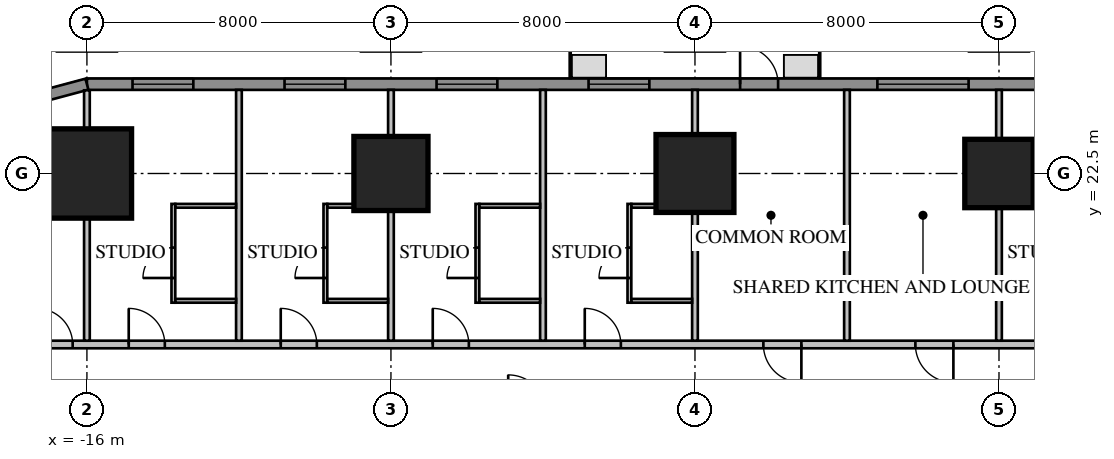
"""IFC4 building model, lengths in metres.
Left out: names, types, materials, properties, quantities, classifications, styles, units other than length and angle.
Written with IfcOpenShell. Run it as: python <this file> out.ifc"""

import sys

from ifc_helpers import new_model, si_unit, direction, frame, frame_2d, origin, origin_2d, place, context, subcontext, project, spatial, rectangle, extrude, element, fill, save


model = new_model("IFC4")
c1 = context("Model", 3, precision=1e-05, world=origin(), true_north=direction((0.0, 1.0)))
c2 = subcontext(c1, "Body", "Model", "MODEL_VIEW")
j1 = project(units=[si_unit("LENGTHUNIT", "METRE"), si_unit("PLANEANGLEUNIT", "RADIAN")], contexts=[c1])
p1 = place(None, origin())
s1 = spatial("IfcSite", under=j1, at=p1, CompositionType="ELEMENT")
p2 = place(p1, origin())
s2 = spatial("IfcBuilding", under=s1, at=p2, CompositionType="ELEMENT")
p3 = place(p2, frame((0.0, 0.0, 46.8)))
s3 = spatial("IfcBuildingStorey", under=s2, at=p3, CompositionType="ELEMENT", Elevation=46.8)
p4 = place(p3, frame((8.0, 22.5, 0.0), z_axis=(0.0, 0.0, 1.0), x_axis=(1.0, 0.0, 0.0)))
e1 = element("IfcColumn", 1, at=p4, inside=s3, PredefinedType="COLUMN", context=c2, shape_type="SweptSolid", body=[
    extrude(rectangle(XDim=1.8, YDim=1.8, at=origin_2d()), origin(), (0.0, 0.0, 1.0), 3.85),
])
p5 = place(p3, frame((0.0, 22.5, 0.0), z_axis=(0.0, 0.0, 1.0), x_axis=(1.0, 0.0, 0.0)))
e2 = element("IfcColumn", 2, at=p5, inside=s3, PredefinedType="COLUMN", context=c2, shape_type="SweptSolid", body=[
    extrude(rectangle(XDim=2.05, YDim=2.05, at=origin_2d()), origin(), (0.0, 0.0, 1.0), 3.85),
])
p6 = place(p3, frame((-8.0, 22.5, 0.0), z_axis=(0.0, 0.0, 1.0), x_axis=(1.0, 0.0, 0.0)))
e3 = element("IfcColumn", 3, at=p6, inside=s3, PredefinedType="COLUMN", context=c2, shape_type="SweptSolid", body=[
    extrude(rectangle(XDim=1.95, YDim=1.95, at=origin_2d()), origin(), (0.0, 0.0, 1.0), 3.85),
])
p7 = place(p3, frame((-16.0, 22.5, 0.0), z_axis=(0.0, 0.0, 1.0), x_axis=(1.0, 0.0, 0.0)))
e4 = element("IfcColumn", 4, at=p7, inside=s3, PredefinedType="COLUMN", context=c2, shape_type="SweptSolid", body=[
    extrude(rectangle(XDim=2.35, YDim=2.35, at=origin_2d()), origin(), (0.0, 0.0, 1.0), 3.85),
])
p8 = place(p3, frame((16.0, 24.85, 0.0), z_axis=(0.0, 0.0, 1.0), x_axis=(-1.0, 0.0, 0.0)))
e5 = element("IfcWall", 5, at=p8, inside=s3, PredefinedType="SOLIDWALL", context=c2, shape_type="SweptSolid", body=[
    extrude(rectangle(XDim=32.0, YDim=0.3, at=frame_2d((16.0, 0.0))), origin(), (0.0, 0.0, 1.0), 3.65),
])
p9 = place(p8, frame((1.2, 0.0, 0.75)))
e6 = element("IfcOpeningElement", 6, at=p9, cuts=e5, PredefinedType="OPENING", context=c2, shape_type="SweptSolid", body=[
    extrude(rectangle(XDim=1.6, YDim=1.8, at=frame_2d((0.8, 0.9))), frame((0.0, 0.17, 0.0), z_axis=(0.0, -1.0, 0.0), x_axis=(1.0, 0.0, 0.0)), (0.0, 0.0, 1.0), 0.34),
])
p10 = place(p8, frame((5.2, 0.0, 0.75)))
e7 = element("IfcOpeningElement", 7, at=p10, cuts=e5, PredefinedType="OPENING", context=c2, shape_type="SweptSolid", body=[
    extrude(rectangle(XDim=1.6, YDim=1.8, at=frame_2d((0.8, 0.9))), frame((0.0, 0.17, 0.0), z_axis=(0.0, -1.0, 0.0), x_axis=(1.0, 0.0, 0.0)), (0.0, 0.0, 1.0), 0.34),
])
p11 = place(p8, frame((17.2, 0.0, 0.75)))
e8 = element("IfcOpeningElement", 8, at=p11, cuts=e5, PredefinedType="OPENING", context=c2, shape_type="SweptSolid", body=[
    extrude(rectangle(XDim=1.6, YDim=1.8, at=frame_2d((0.8, 0.9))), frame((0.0, 0.17, 0.0), z_axis=(0.0, -1.0, 0.0), x_axis=(1.0, 0.0, 0.0)), (0.0, 0.0, 1.0), 0.34),
])
p12 = place(p8, frame((21.2, 0.0, 0.75)))
e9 = element("IfcOpeningElement", 9, at=p12, cuts=e5, PredefinedType="OPENING", context=c2, shape_type="SweptSolid", body=[
    extrude(rectangle(XDim=1.6, YDim=1.8, at=frame_2d((0.8, 0.9))), frame((0.0, 0.17, 0.0), z_axis=(0.0, -1.0, 0.0), x_axis=(1.0, 0.0, 0.0)), (0.0, 0.0, 1.0), 0.34),
])
p13 = place(p8, frame((25.2, 0.0, 0.75)))
e10 = element("IfcOpeningElement", 10, at=p13, cuts=e5, PredefinedType="OPENING", context=c2, shape_type="SweptSolid", body=[
    extrude(rectangle(XDim=1.6, YDim=1.8, at=frame_2d((0.8, 0.9))), frame((0.0, 0.17, 0.0), z_axis=(0.0, -1.0, 0.0), x_axis=(1.0, 0.0, 0.0)), (0.0, 0.0, 1.0), 0.34),
])
p14 = place(p8, frame((29.2, 0.0, 0.75)))
e11 = element("IfcOpeningElement", 11, at=p14, cuts=e5, PredefinedType="OPENING", context=c2, shape_type="SweptSolid", body=[
    extrude(rectangle(XDim=1.6, YDim=1.8, at=frame_2d((0.8, 0.9))), frame((0.0, 0.17, 0.0), z_axis=(0.0, -1.0, 0.0), x_axis=(1.0, 0.0, 0.0)), (0.0, 0.0, 1.0), 0.34),
])
p15 = place(p8, frame((8.8, 0.0, 0.75)))
e12 = element("IfcOpeningElement", 12, at=p15, cuts=e5, PredefinedType="OPENING", context=c2, shape_type="SweptSolid", body=[
    extrude(rectangle(XDim=2.4, YDim=1.8, at=frame_2d((1.2, 0.9))), frame((0.0, 0.17, 0.0), z_axis=(0.0, -1.0, 0.0), x_axis=(1.0, 0.0, 0.0)), (0.0, 0.0, 1.0), 0.34),
])
p16 = place(p8, frame((13.812, 0.0, 0.0)))
e13 = element("IfcOpeningElement", 13, at=p16, cuts=e5, PredefinedType="OPENING", context=c2, shape_type="SweptSolid", body=[
    extrude(rectangle(XDim=1.0, YDim=2.4, at=frame_2d((0.5, 1.2))), frame((0.0, 0.17, 0.0), z_axis=(0.0, -1.0, 0.0), x_axis=(1.0, 0.0, 0.0)), (0.0, 0.0, 1.0), 0.34),
])
p17 = place(p3, frame((-16.0, 24.85, 0.0), z_axis=(0.0, 0.0, 1.0), x_axis=(-0.965920218567, -0.258839972501, 0.0)))
e14 = element("IfcWall", 14, at=p17, inside=s3, PredefinedType="SOLIDWALL", context=c2, shape_type="SweptSolid", body=[
    extrude(rectangle(XDim=4.581, YDim=0.3, at=frame_2d((2.291, 0.0))), origin(), (0.0, 0.0, 1.0), 3.65),
])
p18 = place(p3, frame((18.0, 18.0, 0.0), z_axis=(0.0, 0.0, 1.0), x_axis=(-1.0, 0.0, 0.0)))
e15 = element("IfcWall", 15, at=p18, inside=s3, PredefinedType="PARTITIONING", context=c2, shape_type="SweptSolid", body=[
    extrude(rectangle(XDim=36.0, YDim=0.2, at=frame_2d((18.0, 0.0))), origin(), (0.0, 0.0, 1.0), 3.65),
])
p19 = place(p18, frame((0.375, 0.0, 0.0)))
e16 = element("IfcOpeningElement", 16, at=p19, cuts=e15, PredefinedType="OPENING", context=c2, shape_type="SweptSolid", body=[
    extrude(rectangle(XDim=1.0, YDim=2.1, at=frame_2d((0.5, 1.05))), frame((0.0, 0.12, 0.0), z_axis=(0.0, -1.0, 0.0), x_axis=(1.0, 0.0, 0.0)), (0.0, 0.0, 1.0), 0.24),
])
p20 = place(p18, frame((3.95, 0.0, 0.0)))
e17 = element("IfcOpeningElement", 17, at=p20, cuts=e15, PredefinedType="OPENING", context=c2, shape_type="SweptSolid", body=[
    extrude(rectangle(XDim=0.95, YDim=2.1, at=frame_2d((0.475, 1.05))), frame((0.0, 0.12, 0.0), z_axis=(0.0, -1.0, 0.0), x_axis=(1.0, 0.0, 0.0)), (0.0, 0.0, 1.0), 0.24),
])
p21 = place(p18, frame((7.95, 0.0, 0.0)))
e18 = element("IfcOpeningElement", 18, at=p21, cuts=e15, PredefinedType="OPENING", context=c2, shape_type="SweptSolid", body=[
    extrude(rectangle(XDim=0.95, YDim=2.1, at=frame_2d((0.475, 1.05))), frame((0.0, 0.12, 0.0), z_axis=(0.0, -1.0, 0.0), x_axis=(1.0, 0.0, 0.0)), (0.0, 0.0, 1.0), 0.24),
])
p22 = place(p18, frame((19.95, 0.0, 0.0)))
e19 = element("IfcOpeningElement", 19, at=p22, cuts=e15, PredefinedType="OPENING", context=c2, shape_type="SweptSolid", body=[
    extrude(rectangle(XDim=0.95, YDim=2.1, at=frame_2d((0.475, 1.05))), frame((0.0, 0.12, 0.0), z_axis=(0.0, -1.0, 0.0), x_axis=(1.0, 0.0, 0.0)), (0.0, 0.0, 1.0), 0.24),
])
p23 = place(p18, frame((23.95, 0.0, 0.0)))
e20 = element("IfcOpeningElement", 20, at=p23, cuts=e15, PredefinedType="OPENING", context=c2, shape_type="SweptSolid", body=[
    extrude(rectangle(XDim=0.95, YDim=2.1, at=frame_2d((0.475, 1.05))), frame((0.0, 0.12, 0.0), z_axis=(0.0, -1.0, 0.0), x_axis=(1.0, 0.0, 0.0)), (0.0, 0.0, 1.0), 0.24),
])
p24 = place(p18, frame((27.95, 0.0, 0.0)))
e21 = element("IfcOpeningElement", 21, at=p24, cuts=e15, PredefinedType="OPENING", context=c2, shape_type="SweptSolid", body=[
    extrude(rectangle(XDim=0.95, YDim=2.1, at=frame_2d((0.475, 1.05))), frame((0.0, 0.12, 0.0), z_axis=(0.0, -1.0, 0.0), x_axis=(1.0, 0.0, 0.0)), (0.0, 0.0, 1.0), 0.24),
])
p25 = place(p18, frame((31.95, 0.0, 0.0)))
e22 = element("IfcOpeningElement", 22, at=p25, cuts=e15, PredefinedType="OPENING", context=c2, shape_type="SweptSolid", body=[
    extrude(rectangle(XDim=0.95, YDim=2.1, at=frame_2d((0.475, 1.05))), frame((0.0, 0.12, 0.0), z_axis=(0.0, -1.0, 0.0), x_axis=(1.0, 0.0, 0.0)), (0.0, 0.0, 1.0), 0.24),
])
p26 = place(p18, frame((34.375, 0.0, 0.0)))
e23 = element("IfcOpeningElement", 23, at=p26, cuts=e15, PredefinedType="OPENING", context=c2, shape_type="SweptSolid", body=[
    extrude(rectangle(XDim=0.95, YDim=2.1, at=frame_2d((0.475, 1.05))), frame((0.0, 0.12, 0.0), z_axis=(0.0, -1.0, 0.0), x_axis=(1.0, 0.0, 0.0)), (0.0, 0.0, 1.0), 0.24),
])
p27 = place(p18, frame((11.2, 0.0, 0.0)))
e24 = element("IfcOpeningElement", 24, at=p27, cuts=e15, PredefinedType="OPENING", context=c2, shape_type="SweptSolid", body=[
    extrude(rectangle(XDim=1.0, YDim=2.1, at=frame_2d((0.5, 1.05))), frame((0.0, 0.12, 0.0), z_axis=(0.0, -1.0, 0.0), x_axis=(1.0, 0.0, 0.0)), (0.0, 0.0, 1.0), 0.24),
])
p28 = place(p18, frame((15.2, 0.0, 0.0)))
e25 = element("IfcOpeningElement", 25, at=p28, cuts=e15, PredefinedType="OPENING", context=c2, shape_type="SweptSolid", body=[
    extrude(rectangle(XDim=1.0, YDim=2.1, at=frame_2d((0.5, 1.05))), frame((0.0, 0.12, 0.0), z_axis=(0.0, -1.0, 0.0), x_axis=(1.0, 0.0, 0.0)), (0.0, 0.0, 1.0), 0.24),
])
for number, where, z_axis, x_axis in (
    (26, (8.0, 18.1, 0.0), (0.0, 0.0, 1.0), (0.0, 1.0, 0.0)),
    (27, (4.0, 18.1, 0.0), (0.0, 0.0, 1.0), (0.0, 1.0, 0.0)),
):
    element("IfcWall", number, at=place(p3, frame(where, z_axis=z_axis, x_axis=x_axis)), inside=s3, PredefinedType="PARTITIONING", context=c2, shape_type="SweptSolid", body=[
        extrude(rectangle(XDim=6.6, YDim=0.15, at=frame_2d((3.3, 0.0))), origin(), (0.0, 0.0, 1.0), 3.65),
    ])
p29 = place(p3, frame((0.0, 18.1, 0.0), z_axis=(0.0, 0.0, 1.0), x_axis=(0.0, 1.0, 0.0)))
e28 = element("IfcWall", 28, at=p29, inside=s3, PredefinedType="PARTITIONING", context=c2, shape_type="SweptSolid", body=[
    extrude(rectangle(XDim=6.6, YDim=0.15, at=frame_2d((3.3, 0.0))), origin(), (0.0, 0.0, 1.0), 2.809),
])
for number, where, z_axis, x_axis in (
    (29, (-4.0, 18.1, 0.0), (0.0, 0.0, 1.0), (0.0, 1.0, 0.0)),
    (30, (-8.0, 18.1, 0.0), (0.0, 0.0, 1.0), (0.0, 1.0, 0.0)),
    (31, (-12.0, 18.1, 0.0), (0.0, 0.0, 1.0), (0.0, 1.0, 0.0)),
):
    element("IfcWall", number, at=place(p3, frame(where, z_axis=z_axis, x_axis=x_axis)), inside=s3, PredefinedType="PARTITIONING", context=c2, shape_type="SweptSolid", body=[
        extrude(rectangle(XDim=6.6, YDim=0.15, at=frame_2d((3.3, 0.0))), origin(), (0.0, 0.0, 1.0), 3.65),
    ])
p30 = place(p3, frame((-16.0, 18.1, 0.0), z_axis=(0.0, 0.0, 1.0), x_axis=(0.0, 1.0, 0.0)))
e32 = element("IfcWall", 32, at=p30, inside=s3, PredefinedType="PARTITIONING", context=c2, shape_type="SweptSolid", body=[
    extrude(rectangle(XDim=6.589, YDim=0.15, at=frame_2d((3.295, 0.0))), origin(), (0.0, 0.0, 1.0), 3.65),
])
p31 = place(p3, frame((-1.725, 19.1, 0.0), z_axis=(0.0, 0.0, 1.0), x_axis=(0.0, 1.0, 0.0)))
e33 = element("IfcWall", 33, at=p31, inside=s3, PredefinedType="PARTITIONING", context=c2, shape_type="SweptSolid", body=[
    extrude(rectangle(XDim=2.6, YDim=0.1, at=frame_2d((1.3, 0.0))), origin(), (0.0, 0.0, 1.0), 3.65),
])
p32 = place(p31, frame((0.65, 0.0, 0.0)))
e34 = element("IfcOpeningElement", 34, at=p32, cuts=e33, PredefinedType="OPENING", context=c2, shape_type="SweptSolid", body=[
    extrude(rectangle(XDim=0.8, YDim=2.1, at=frame_2d((0.4, 1.05))), frame((0.0, 0.07, 0.0), z_axis=(0.0, -1.0, 0.0), x_axis=(1.0, 0.0, 0.0)), (0.0, 0.0, 1.0), 0.14),
])
p33 = place(p3, frame((-0.075, 21.65, 0.0), z_axis=(0.0, 0.0, 1.0), x_axis=(-1.0, 0.0, 0.0)))
e35 = element("IfcWall", 35, at=p33, inside=s3, PredefinedType="PARTITIONING", context=c2, shape_type="SweptSolid", body=[
    extrude(rectangle(XDim=1.6, YDim=0.1, at=frame_2d((0.8, 0.0))), origin(), (0.0, 0.0, 1.0), 3.65),
])
p34 = place(p3, frame((-0.075, 19.15, 0.0), z_axis=(0.0, 0.0, 1.0), x_axis=(-1.0, 0.0, 0.0)))
e36 = element("IfcWall", 36, at=p34, inside=s3, PredefinedType="PARTITIONING", context=c2, shape_type="SweptSolid", body=[
    extrude(rectangle(XDim=1.6, YDim=0.1, at=frame_2d((0.8, 0.0))), origin(), (0.0, 0.0, 1.0), 3.122),
])
p35 = place(p3, frame((-5.725, 19.1, 0.0), z_axis=(0.0, 0.0, 1.0), x_axis=(0.0, 1.0, 0.0)))
e37 = element("IfcWall", 37, at=p35, inside=s3, PredefinedType="PARTITIONING", context=c2, shape_type="SweptSolid", body=[
    extrude(rectangle(XDim=2.6, YDim=0.1, at=frame_2d((1.3, 0.0))), origin(), (0.0, 0.0, 1.0), 3.65),
])
p36 = place(p35, frame((0.65, 0.0, 0.0)))
e38 = element("IfcOpeningElement", 38, at=p36, cuts=e37, PredefinedType="OPENING", context=c2, shape_type="SweptSolid", body=[
    extrude(rectangle(XDim=0.8, YDim=2.1, at=frame_2d((0.4, 1.05))), frame((0.0, 0.07, 0.0), z_axis=(0.0, -1.0, 0.0), x_axis=(1.0, 0.0, 0.0)), (0.0, 0.0, 1.0), 0.14),
])
p37 = place(p3, frame((-4.075, 21.65, 0.0), z_axis=(0.0, 0.0, 1.0), x_axis=(-1.0, 0.0, 0.0)))
e39 = element("IfcWall", 39, at=p37, inside=s3, PredefinedType="PARTITIONING", context=c2, shape_type="SweptSolid", body=[
    extrude(rectangle(XDim=1.6, YDim=0.1, at=frame_2d((0.8, 0.0))), origin(), (0.0, 0.0, 1.0), 3.65),
])
p38 = place(p3, frame((-4.075, 19.15, 0.0), z_axis=(0.0, 0.0, 1.0), x_axis=(-1.0, 0.0, 0.0)))
e40 = element("IfcWall", 40, at=p38, inside=s3, PredefinedType="PARTITIONING", context=c2, shape_type="SweptSolid", body=[
    extrude(rectangle(XDim=1.6, YDim=0.1, at=frame_2d((0.8, 0.0))), origin(), (0.0, 0.0, 1.0), 3.122),
])
p39 = place(p3, frame((-9.725, 19.1, 0.0), z_axis=(0.0, 0.0, 1.0), x_axis=(0.0, 1.0, 0.0)))
e41 = element("IfcWall", 41, at=p39, inside=s3, PredefinedType="PARTITIONING", context=c2, shape_type="SweptSolid", body=[
    extrude(rectangle(XDim=2.6, YDim=0.1, at=frame_2d((1.3, 0.0))), origin(), (0.0, 0.0, 1.0), 3.65),
])
p40 = place(p39, frame((0.65, 0.0, 0.0)))
e42 = element("IfcOpeningElement", 42, at=p40, cuts=e41, PredefinedType="OPENING", context=c2, shape_type="SweptSolid", body=[
    extrude(rectangle(XDim=0.8, YDim=2.1, at=frame_2d((0.4, 1.05))), frame((0.0, 0.07, 0.0), z_axis=(0.0, -1.0, 0.0), x_axis=(1.0, 0.0, 0.0)), (0.0, 0.0, 1.0), 0.14),
])
p41 = place(p3, frame((-8.075, 21.65, 0.0), z_axis=(0.0, 0.0, 1.0), x_axis=(-1.0, 0.0, 0.0)))
e43 = element("IfcWall", 43, at=p41, inside=s3, PredefinedType="PARTITIONING", context=c2, shape_type="SweptSolid", body=[
    extrude(rectangle(XDim=1.6, YDim=0.1, at=frame_2d((0.8, 0.0))), origin(), (0.0, 0.0, 1.0), 3.65),
])
p42 = place(p3, frame((-8.075, 19.15, 0.0), z_axis=(0.0, 0.0, 1.0), x_axis=(-1.0, 0.0, 0.0)))
e44 = element("IfcWall", 44, at=p42, inside=s3, PredefinedType="PARTITIONING", context=c2, shape_type="SweptSolid", body=[
    extrude(rectangle(XDim=1.6, YDim=0.1, at=frame_2d((0.8, 0.0))), origin(), (0.0, 0.0, 1.0), 3.122),
])
p43 = place(p3, frame((-13.725, 19.1, 0.0), z_axis=(0.0, 0.0, 1.0), x_axis=(0.0, 1.0, 0.0)))
e45 = element("IfcWall", 45, at=p43, inside=s3, PredefinedType="PARTITIONING", context=c2, shape_type="SweptSolid", body=[
    extrude(rectangle(XDim=2.6, YDim=0.1, at=frame_2d((1.3, 0.0))), origin(), (0.0, 0.0, 1.0), 3.65),
])
p44 = place(p43, frame((0.65, 0.0, 0.0)))
e46 = element("IfcOpeningElement", 46, at=p44, cuts=e45, PredefinedType="OPENING", context=c2, shape_type="SweptSolid", body=[
    extrude(rectangle(XDim=0.8, YDim=2.1, at=frame_2d((0.4, 1.05))), frame((0.0, 0.07, 0.0), z_axis=(0.0, -1.0, 0.0), x_axis=(1.0, 0.0, 0.0)), (0.0, 0.0, 1.0), 0.14),
])
p45 = place(p3, frame((-12.075, 21.65, 0.0), z_axis=(0.0, 0.0, 1.0), x_axis=(-1.0, 0.0, 0.0)))
e47 = element("IfcWall", 47, at=p45, inside=s3, PredefinedType="PARTITIONING", context=c2, shape_type="SweptSolid", body=[
    extrude(rectangle(XDim=1.6, YDim=0.1, at=frame_2d((0.8, 0.0))), origin(), (0.0, 0.0, 1.0), 3.65),
])
p46 = place(p3, frame((-12.075, 19.15, 0.0), z_axis=(0.0, 0.0, 1.0), x_axis=(-1.0, 0.0, 0.0)))
e48 = element("IfcWall", 48, at=p46, inside=s3, PredefinedType="PARTITIONING", context=c2, shape_type="SweptSolid", body=[
    extrude(rectangle(XDim=1.6, YDim=0.1, at=frame_2d((0.8, 0.0))), origin(), (0.0, 0.0, 1.0), 3.122),
])
p47 = place(p11, origin())
e49 = element("IfcWindow", 49, at=p47, inside=s3, PartitioningType="SINGLE_PANEL", PredefinedType="WINDOW", context=c2, shape_type="SweptSolid", body=[
    extrude(rectangle(XDim=1.6, YDim=1.8, at=frame_2d((0.8, 0.9))), frame((0.0, 0.03, 0.0), z_axis=(0.0, -1.0, 0.0), x_axis=(1.0, 0.0, 0.0)), (0.0, 0.0, 1.0), 0.06),
])
fill(e8, e49)
p48 = place(p12, origin())
e50 = element("IfcWindow", 50, at=p48, inside=s3, PartitioningType="SINGLE_PANEL", PredefinedType="WINDOW", context=c2, shape_type="SweptSolid", body=[
    extrude(rectangle(XDim=1.6, YDim=1.8, at=frame_2d((0.8, 0.9))), frame((0.0, 0.03, 0.0), z_axis=(0.0, -1.0, 0.0), x_axis=(1.0, 0.0, 0.0)), (0.0, 0.0, 1.0), 0.06),
])
fill(e9, e50)
p49 = place(p13, origin())
e51 = element("IfcWindow", 51, at=p49, inside=s3, PartitioningType="SINGLE_PANEL", PredefinedType="WINDOW", context=c2, shape_type="SweptSolid", body=[
    extrude(rectangle(XDim=1.6, YDim=1.8, at=frame_2d((0.8, 0.9))), frame((0.0, 0.03, 0.0), z_axis=(0.0, -1.0, 0.0), x_axis=(1.0, 0.0, 0.0)), (0.0, 0.0, 1.0), 0.06),
])
fill(e10, e51)
p50 = place(p14, origin())
e52 = element("IfcWindow", 52, at=p50, inside=s3, PartitioningType="SINGLE_PANEL", PredefinedType="WINDOW", context=c2, shape_type="SweptSolid", body=[
    extrude(rectangle(XDim=1.6, YDim=1.8, at=frame_2d((0.8, 0.9))), frame((0.0, 0.03, 0.0), z_axis=(0.0, -1.0, 0.0), x_axis=(1.0, 0.0, 0.0)), (0.0, 0.0, 1.0), 0.06),
])
fill(e11, e52)
p51 = place(p15, origin())
e53 = element("IfcWindow", 53, at=p51, inside=s3, PartitioningType="SINGLE_PANEL", PredefinedType="WINDOW", context=c2, shape_type="SweptSolid", body=[
    extrude(rectangle(XDim=2.4, YDim=1.8, at=frame_2d((1.2, 0.9))), frame((0.0, 0.03, 0.0), z_axis=(0.0, -1.0, 0.0), x_axis=(1.0, 0.0, 0.0)), (0.0, 0.0, 1.0), 0.06),
])
fill(e12, e53)
p52 = place(p16, origin())
e54 = element("IfcDoor", 54, at=p52, inside=s3, OperationType="SINGLE_SWING_RIGHT", PredefinedType="DOOR", context=c2, shape_type="SweptSolid", body=[
    extrude(rectangle(XDim=1.0, YDim=2.4, at=frame_2d((0.5, 1.2))), frame((0.0, 0.025, 0.0), z_axis=(0.0, -1.0, 0.0), x_axis=(1.0, 0.0, 0.0)), (0.0, 0.0, 1.0), 0.05),
])
fill(e13, e54)
p53 = place(p22, origin())
e55 = element("IfcDoor", 55, at=p53, inside=s3, OperationType="SINGLE_SWING_RIGHT", PredefinedType="DOOR", context=c2, shape_type="SweptSolid", body=[
    extrude(rectangle(XDim=0.95, YDim=2.1, at=frame_2d((0.475, 1.05))), frame((0.0, 0.025, 0.0), z_axis=(0.0, -1.0, 0.0), x_axis=(1.0, 0.0, 0.0)), (0.0, 0.0, 1.0), 0.05),
])
fill(e19, e55)
p54 = place(p32, origin())
e56 = element("IfcDoor", 56, at=p54, inside=s3, OperationType="SINGLE_SWING_LEFT", PredefinedType="DOOR", context=c2, shape_type="SweptSolid", body=[
    extrude(rectangle(XDim=0.8, YDim=2.1, at=frame_2d((0.4, 1.05))), frame((0.0, 0.025, 0.0), z_axis=(0.0, -1.0, 0.0), x_axis=(1.0, 0.0, 0.0)), (0.0, 0.0, 1.0), 0.05),
])
fill(e34, e56)
p55 = place(p23, origin())
e57 = element("IfcDoor", 57, at=p55, inside=s3, OperationType="SINGLE_SWING_RIGHT", PredefinedType="DOOR", context=c2, shape_type="SweptSolid", body=[
    extrude(rectangle(XDim=0.95, YDim=2.1, at=frame_2d((0.475, 1.05))), frame((0.0, 0.025, 0.0), z_axis=(0.0, -1.0, 0.0), x_axis=(1.0, 0.0, 0.0)), (0.0, 0.0, 1.0), 0.05),
])
fill(e20, e57)
p56 = place(p36, origin())
e58 = element("IfcDoor", 58, at=p56, inside=s3, OperationType="SINGLE_SWING_LEFT", PredefinedType="DOOR", context=c2, shape_type="SweptSolid", body=[
    extrude(rectangle(XDim=0.8, YDim=2.1, at=frame_2d((0.4, 1.05))), frame((0.0, 0.025, 0.0), z_axis=(0.0, -1.0, 0.0), x_axis=(1.0, 0.0, 0.0)), (0.0, 0.0, 1.0), 0.05),
])
fill(e38, e58)
p57 = place(p24, origin())
e59 = element("IfcDoor", 59, at=p57, inside=s3, OperationType="SINGLE_SWING_RIGHT", PredefinedType="DOOR", context=c2, shape_type="SweptSolid", body=[
    extrude(rectangle(XDim=0.95, YDim=2.1, at=frame_2d((0.475, 1.05))), frame((0.0, 0.025, 0.0), z_axis=(0.0, -1.0, 0.0), x_axis=(1.0, 0.0, 0.0)), (0.0, 0.0, 1.0), 0.05),
])
fill(e21, e59)
p58 = place(p40, origin())
e60 = element("IfcDoor", 60, at=p58, inside=s3, OperationType="SINGLE_SWING_LEFT", PredefinedType="DOOR", context=c2, shape_type="SweptSolid", body=[
    extrude(rectangle(XDim=0.8, YDim=2.1, at=frame_2d((0.4, 1.05))), frame((0.0, 0.025, 0.0), z_axis=(0.0, -1.0, 0.0), x_axis=(1.0, 0.0, 0.0)), (0.0, 0.0, 1.0), 0.05),
])
fill(e42, e60)
p59 = place(p25, origin())
e61 = element("IfcDoor", 61, at=p59, inside=s3, OperationType="SINGLE_SWING_RIGHT", PredefinedType="DOOR", context=c2, shape_type="SweptSolid", body=[
    extrude(rectangle(XDim=0.95, YDim=2.1, at=frame_2d((0.475, 1.05))), frame((0.0, 0.025, 0.0), z_axis=(0.0, -1.0, 0.0), x_axis=(1.0, 0.0, 0.0)), (0.0, 0.0, 1.0), 0.05),
])
fill(e22, e61)
p60 = place(p44, origin())
e62 = element("IfcDoor", 62, at=p60, inside=s3, OperationType="SINGLE_SWING_LEFT", PredefinedType="DOOR", context=c2, shape_type="SweptSolid", body=[
    extrude(rectangle(XDim=0.8, YDim=2.1, at=frame_2d((0.4, 1.05))), frame((0.0, 0.025, 0.0), z_axis=(0.0, -1.0, 0.0), x_axis=(1.0, 0.0, 0.0)), (0.0, 0.0, 1.0), 0.05),
])
fill(e46, e62)
p61 = place(p26, origin())
e63 = element("IfcDoor", 63, at=p61, inside=s3, OperationType="SINGLE_SWING_RIGHT", PredefinedType="DOOR", context=c2, shape_type="SweptSolid", body=[
    extrude(rectangle(XDim=0.95, YDim=2.1, at=frame_2d((0.475, 1.05))), frame((0.0, 0.025, 0.0), z_axis=(0.0, -1.0, 0.0), x_axis=(1.0, 0.0, 0.0)), (0.0, 0.0, 1.0), 0.05),
])
fill(e23, e63)
p62 = place(p27, origin())
e64 = element("IfcDoor", 64, at=p62, inside=s3, OperationType="SINGLE_SWING_LEFT", PredefinedType="DOOR", context=c2, shape_type="SweptSolid", body=[
    extrude(rectangle(XDim=1.0, YDim=2.1, at=frame_2d((0.5, 1.05))), frame((0.0, 0.025, 0.0), z_axis=(0.0, -1.0, 0.0), x_axis=(1.0, 0.0, 0.0)), (0.0, 0.0, 1.0), 0.05),
])
fill(e24, e64)
p63 = place(p28, origin())
e65 = element("IfcDoor", 65, at=p63, inside=s3, OperationType="SINGLE_SWING_LEFT", PredefinedType="DOOR", context=c2, shape_type="SweptSolid", body=[
    extrude(rectangle(XDim=1.0, YDim=2.1, at=frame_2d((0.5, 1.05))), frame((0.0, 0.025, 0.0), z_axis=(0.0, -1.0, 0.0), x_axis=(1.0, 0.0, 0.0)), (0.0, 0.0, 1.0), 0.05),
])
fill(e25, e65)
save(model, sys.argv[1])
